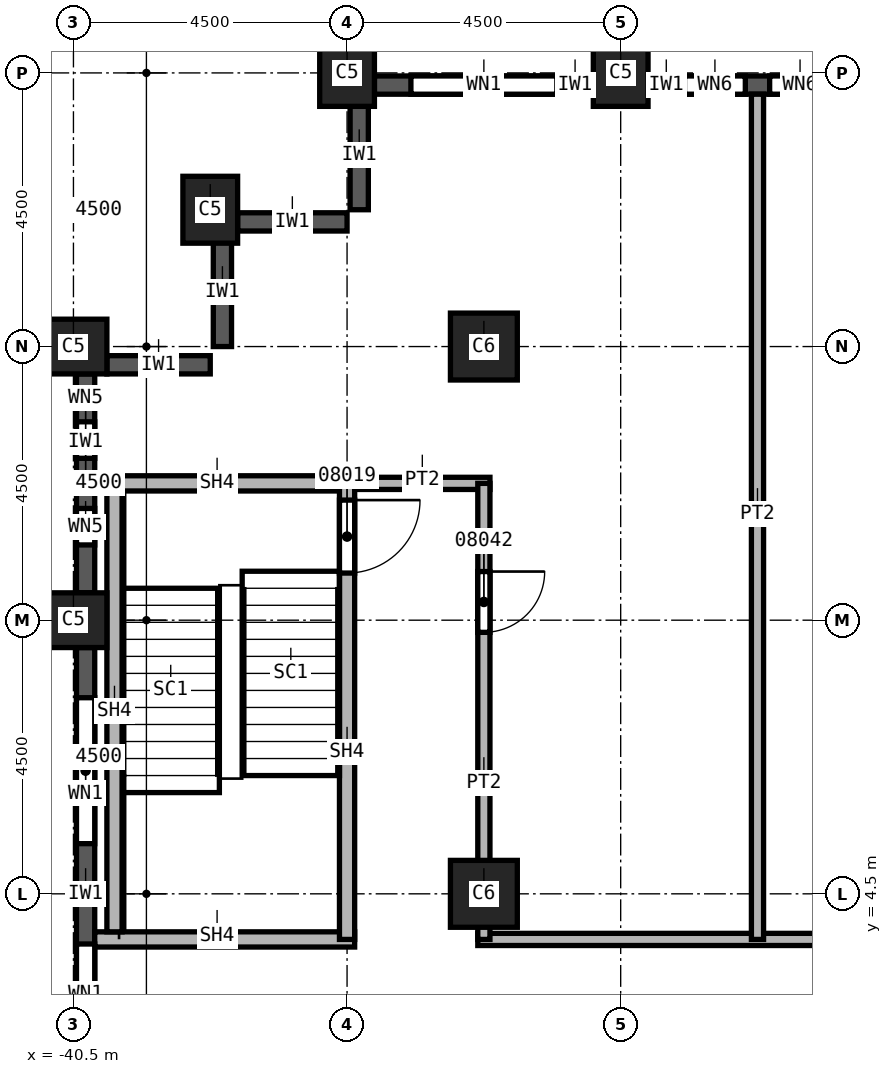
"""IFC4 building model, lengths in metres.
Left out: names, types, materials, properties, quantities, classifications, styles, units other than length and angle.
Written with IfcOpenShell. Run it as: python <this file> out.ifc"""

import sys

from ifc_helpers import new_model, si_unit, direction, frame, frame_2d, origin, origin_2d, place, context, subcontext, project, spatial, rectangle, extrude, element, fill, save


model = new_model("IFC4")
c1 = context("Model", 3, precision=1e-05, world=origin(), true_north=direction((0.0, 1.0)))
c2 = subcontext(c1, "Body", "Model", "MODEL_VIEW")
j1 = project(units=[si_unit("LENGTHUNIT", "METRE"), si_unit("PLANEANGLEUNIT", "RADIAN")], contexts=[c1])
p1 = place(None, origin())
s1 = spatial("IfcSite", under=j1, at=p1, CompositionType="ELEMENT")
p2 = place(p1, origin())
s2 = spatial("IfcBuilding", under=s1, at=p2, CompositionType="ELEMENT")
p3 = place(p2, frame((0.0, 0.0, 150.0)))
s3 = spatial("IfcBuildingStorey", under=s2, at=p3, CompositionType="ELEMENT", Elevation=150.0)
for number, where, z_axis, x_axis in (
    (1, (-40.5, 9.0, 0.0), (0.0, 0.0, 1.0), (0.0, 1.0, 0.0)),
    (2, (-40.5, 13.5, 0.0), (0.0, 0.0, 1.0), (0.0, 1.0, 0.0)),
    (3, (-38.25, 15.75, 0.0), (0.0, 0.0, 1.0), (1.0, 0.0, 0.0)),
    (4, (-31.5, 18.0, 0.0), (0.0, 0.0, 1.0), (1.0, 0.0, 0.0)),
    (5, (-36.0, 18.0, 0.0), (0.0, 0.0, 1.0), (1.0, 0.0, 0.0)),
):
    element("IfcColumn", number, at=place(p3, frame(where, z_axis=z_axis, x_axis=x_axis)), inside=s3, PredefinedType="COLUMN", context=c2, shape_type="SweptSolid", body=[
        extrude(rectangle(XDim=0.9, YDim=1.1, at=origin_2d()), origin(), (0.0, 0.0, 1.0), 3.7),
    ])
for number, where, z_axis, x_axis in (
    (6, (-33.75, 4.5, 0.0), (0.0, 0.0, 1.0), (1.0, 0.0, 0.0)),
    (7, (-33.75, 13.5, 0.0), (0.0, 0.0, 1.0), (1.0, 0.0, 0.0)),
):
    element("IfcColumn", number, at=place(p3, frame(where, z_axis=z_axis, x_axis=x_axis)), inside=s3, PredefinedType="COLUMN", context=c2, shape_type="SweptSolid", body=[
        extrude(rectangle(XDim=1.1, YDim=1.1, at=origin_2d()), origin(), (0.0, 0.0, 1.0), 3.7),
    ])
for number, where, z_axis, x_axis in (
    (8, (-35.8, 17.55, 0.0), (0.0, 0.0, 1.0), (0.0, -1.0, 0.0)),
    (9, (-37.8, 15.55, 0.0), (0.0, 0.0, 1.0), (1.0, 0.0, 0.0)),
    (10, (-38.05, 15.3, 0.0), (0.0, 0.0, 1.0), (0.0, -1.0, 0.0)),
):
    element("IfcWall", number, at=place(p3, frame(where, z_axis=z_axis, x_axis=x_axis)), inside=s3, PredefinedType="SOLIDWALL", context=c2, shape_type="SweptSolid", body=[
        extrude(rectangle(XDim=1.8, YDim=0.3, at=frame_2d((0.9, 0.0))), origin(), (0.0, 0.0, 1.0), 3.1),
    ])
p4 = place(p3, frame((-39.95, 13.2, 0.0), z_axis=(0.0, 0.0, 1.0), x_axis=(1.0, 0.0, 0.0)))
e11 = element("IfcWall", 11, at=p4, inside=s3, PredefinedType="SOLIDWALL", context=c2, shape_type="SweptSolid", body=[
    extrude(rectangle(XDim=1.7, YDim=0.3, at=frame_2d((0.85, 0.0))), origin(), (0.0, 0.0, 1.0), 3.1),
])
p5 = place(p3, frame((-27.45, 17.8, 0.0), z_axis=(0.0, 0.0, 1.0), x_axis=(-1.0, 0.0, 0.0)))
e12 = element("IfcWall", 12, at=p5, inside=s3, PredefinedType="SOLIDWALL", context=c2, shape_type="SweptSolid", body=[
    extrude(rectangle(XDim=3.6, YDim=0.3, at=frame_2d((1.8, 0.0))), origin(), (0.0, 0.0, 1.0), 3.1),
])
p6 = place(p5, frame((0.6, 0.0, 0.8)))
e13 = element("IfcOpeningElement", 13, at=p6, cuts=e12, PredefinedType="OPENING", context=c2, shape_type="SweptSolid", body=[
    extrude(rectangle(XDim=1.0, YDim=1.95, at=frame_2d((0.5, 0.975))), frame((0.0, 0.15, 0.0), z_axis=(0.0, -1.0, 0.0), x_axis=(1.0, 0.0, 0.0)), (0.0, 0.0, 1.0), 0.3),
])
p7 = place(p5, frame((2.0, 0.0, 0.8)))
e14 = element("IfcOpeningElement", 14, at=p7, cuts=e12, PredefinedType="OPENING", context=c2, shape_type="SweptSolid", body=[
    extrude(rectangle(XDim=1.0, YDim=1.95, at=frame_2d((0.5, 0.975))), frame((0.0, 0.15, 0.0), z_axis=(0.0, -1.0, 0.0), x_axis=(1.0, 0.0, 0.0)), (0.0, 0.0, 1.0), 0.3),
])
p8 = place(p3, frame((-31.95, 17.8, 0.0), z_axis=(0.0, 0.0, 1.0), x_axis=(-1.0, 0.0, 0.0)))
e15 = element("IfcWall", 15, at=p8, inside=s3, PredefinedType="SOLIDWALL", context=c2, shape_type="SweptSolid", body=[
    extrude(rectangle(XDim=3.6, YDim=0.3, at=frame_2d((1.8, 0.0))), origin(), (0.0, 0.0, 1.0), 3.1),
])
p9 = place(p8, frame((0.6, 0.0, 0.8)))
e16 = element("IfcOpeningElement", 16, at=p9, cuts=e15, PredefinedType="OPENING", context=c2, shape_type="SweptSolid", body=[
    extrude(rectangle(XDim=2.4, YDim=1.95, at=frame_2d((1.2, 0.975))), frame((0.0, 0.15, 0.0), z_axis=(0.0, -1.0, 0.0), x_axis=(1.0, 0.0, 0.0)), (0.0, 0.0, 1.0), 0.3),
])
p10 = place(p3, frame((-40.3, 13.05, 0.0), z_axis=(0.0, 0.0, 1.0), x_axis=(0.0, -1.0, 0.0)))
e17 = element("IfcWall", 17, at=p10, inside=s3, PredefinedType="SOLIDWALL", context=c2, shape_type="SweptSolid", body=[
    extrude(rectangle(XDim=3.6, YDim=0.3, at=frame_2d((1.8, 0.0))), origin(), (0.0, 0.0, 1.0), 3.1),
])
p11 = place(p10, frame((0.788, 0.0, 0.8)))
e18 = element("IfcOpeningElement", 18, at=p11, cuts=e17, PredefinedType="OPENING", context=c2, shape_type="SweptSolid", body=[
    extrude(rectangle(XDim=0.6, YDim=1.95, at=frame_2d((0.3, 0.975))), frame((0.0, 0.15, 0.0), z_axis=(0.0, -1.0, 0.0), x_axis=(1.0, 0.0, 0.0)), (0.0, 0.0, 1.0), 0.3),
])
p12 = place(p10, frame((2.212, 0.0, 0.8)))
e19 = element("IfcOpeningElement", 19, at=p12, cuts=e17, PredefinedType="OPENING", context=c2, shape_type="SweptSolid", body=[
    extrude(rectangle(XDim=0.6, YDim=1.95, at=frame_2d((0.3, 0.975))), frame((0.0, 0.15, 0.0), z_axis=(0.0, -1.0, 0.0), x_axis=(1.0, 0.0, 0.0)), (0.0, 0.0, 1.0), 0.3),
])
p13 = place(p3, frame((-40.3, 8.55, 0.0), z_axis=(0.0, 0.0, 1.0), x_axis=(0.0, -1.0, 0.0)))
e20 = element("IfcWall", 20, at=p13, inside=s3, PredefinedType="SOLIDWALL", context=c2, shape_type="SweptSolid", body=[
    extrude(rectangle(XDim=8.1, YDim=0.3, at=frame_2d((4.05, 0.0))), origin(), (0.0, 0.0, 1.0), 3.1),
])
p14 = place(p13, frame((0.825, 0.0, 0.8)))
e21 = element("IfcOpeningElement", 21, at=p14, cuts=e20, PredefinedType="OPENING", context=c2, shape_type="SweptSolid", body=[
    extrude(rectangle(XDim=2.4, YDim=1.95, at=frame_2d((1.2, 0.975))), frame((0.0, 0.15, 0.0), z_axis=(0.0, -1.0, 0.0), x_axis=(1.0, 0.0, 0.0)), (0.0, 0.0, 1.0), 0.3),
])
p15 = place(p13, frame((4.875, 0.0, 0.8)))
e22 = element("IfcOpeningElement", 22, at=p15, cuts=e20, PredefinedType="OPENING", context=c2, shape_type="SweptSolid", body=[
    extrude(rectangle(XDim=2.4, YDim=1.95, at=frame_2d((1.2, 0.975))), frame((0.0, 0.15, 0.0), z_axis=(0.0, -1.0, 0.0), x_axis=(1.0, 0.0, 0.0)), (0.0, 0.0, 1.0), 0.3),
])
p16 = place(p3, frame((-36.0, 11.25, 0.0), z_axis=(0.0, 0.0, 1.0), x_axis=(1.0, 0.0, 0.0)))
e23 = element("IfcWall", 23, at=p16, inside=s3, PredefinedType="PARTITIONING", context=c2, shape_type="SweptSolid", body=[
    extrude(rectangle(XDim=2.35, YDim=0.2, at=frame_2d((1.175, 0.0))), origin(), (0.0, 0.0, 1.0), 3.7),
])
p17 = place(p3, frame((-33.85, 3.75, 0.0), z_axis=(0.0, 0.0, 1.0), x_axis=(1.0, 0.0, 0.0)))
e24 = element("IfcWall", 24, at=p17, inside=s3, PredefinedType="PARTITIONING", context=c2, shape_type="SweptSolid", body=[
    extrude(rectangle(XDim=13.95, YDim=0.2, at=frame_2d((6.975, 0.0))), origin(), (0.0, 0.0, 1.0), 3.7),
])
p18 = place(p3, frame((-33.75, 11.25, 0.0), z_axis=(0.0, 0.0, 1.0), x_axis=(0.0, -1.0, 0.0)))
e25 = element("IfcWall", 25, at=p18, inside=s3, PredefinedType="PARTITIONING", context=c2, shape_type="SweptSolid", body=[
    extrude(rectangle(XDim=7.5, YDim=0.2, at=frame_2d((3.75, 0.0))), origin(), (0.0, 0.0, 1.0), 3.7),
])
p19 = place(p18, frame((1.45, 0.0, 0.0)))
e26 = element("IfcOpeningElement", 26, at=p19, cuts=e25, PredefinedType="OPENING", context=c2, shape_type="SweptSolid", body=[
    extrude(rectangle(XDim=1.0, YDim=2.1, at=frame_2d((0.5, 1.05))), frame((0.0, 0.1, 0.0), z_axis=(0.0, -1.0, 0.0), x_axis=(1.0, 0.0, 0.0)), (0.0, 0.0, 1.0), 0.2),
])
p20 = place(p3, frame((-29.25, 3.75, 0.0), z_axis=(0.0, 0.0, 1.0), x_axis=(0.0, 1.0, 0.0)))
e27 = element("IfcWall", 27, at=p20, inside=s3, PredefinedType="PARTITIONING", context=c2, shape_type="SweptSolid", body=[
    extrude(rectangle(XDim=13.9, YDim=0.2, at=frame_2d((6.95, 0.0))), origin(), (0.0, 0.0, 1.0), 3.7),
])
p21 = place(p3, frame((-40.15, 3.75, 0.0), z_axis=(0.0, 0.0, 1.0), x_axis=(1.0, 0.0, 0.0)))
e28 = element("IfcWall", 28, at=p21, inside=s3, PredefinedType="SOLIDWALL", context=c2, shape_type="SweptSolid", body=[
    extrude(rectangle(XDim=4.275, YDim=0.25, at=frame_2d((2.137, 0.0))), origin(), (0.0, 0.0, 1.0), 3.7),
])
p22 = place(p3, frame((-40.15, 11.25, 0.0), z_axis=(0.0, 0.0, 1.0), x_axis=(1.0, 0.0, 0.0)))
e29 = element("IfcWall", 29, at=p22, inside=s3, PredefinedType="SOLIDWALL", context=c2, shape_type="SweptSolid", body=[
    extrude(rectangle(XDim=4.15, YDim=0.25, at=frame_2d((2.075, 0.0))), origin(), (0.0, 0.0, 1.0), 3.7),
])
p23 = place(p3, frame((-36.0, 11.375, 0.0), z_axis=(0.0, 0.0, 1.0), x_axis=(0.0, -1.0, 0.0)))
e30 = element("IfcWall", 30, at=p23, inside=s3, PredefinedType="SOLIDWALL", context=c2, shape_type="SweptSolid", body=[
    extrude(rectangle(XDim=7.625, YDim=0.25, at=frame_2d((3.812, 0.0))), origin(), (0.0, 0.0, 1.0), 3.7),
])
p24 = place(p23, frame((0.4, 0.0, 0.0)))
e31 = element("IfcOpeningElement", 31, at=p24, cuts=e30, PredefinedType="OPENING", context=c2, shape_type="SweptSolid", body=[
    extrude(rectangle(XDim=1.2, YDim=2.1, at=frame_2d((0.6, 1.05))), frame((0.0, 0.125, 0.0), z_axis=(0.0, -1.0, 0.0), x_axis=(1.0, 0.0, 0.0)), (0.0, 0.0, 1.0), 0.25),
])
p25 = place(p3, frame((-39.825, 3.875, 0.0), z_axis=(0.0, 0.0, 1.0), x_axis=(0.0, 1.0, 0.0)))
e32 = element("IfcWall", 32, at=p25, inside=s3, PredefinedType="SOLIDWALL", context=c2, shape_type="SweptSolid", body=[
    extrude(rectangle(XDim=7.25, YDim=0.25, at=frame_2d((3.625, 0.0))), origin(), (0.0, 0.0, 1.0), 3.7),
])
p26 = place(p9, origin())
e33 = element("IfcWindow", 33, at=p26, inside=s3, PartitioningType="SINGLE_PANEL", PredefinedType="WINDOW", context=c2, shape_type="SweptSolid", body=[
    extrude(rectangle(XDim=2.4, YDim=1.95, at=frame_2d((1.2, 0.975))), frame((0.0, 0.03, 0.0), z_axis=(0.0, -1.0, 0.0), x_axis=(1.0, 0.0, 0.0)), (0.0, 0.0, 1.0), 0.06),
])
fill(e16, e33)
p27 = place(p14, origin())
e34 = element("IfcWindow", 34, at=p27, inside=s3, PartitioningType="SINGLE_PANEL", PredefinedType="WINDOW", context=c2, shape_type="SweptSolid", body=[
    extrude(rectangle(XDim=2.4, YDim=1.95, at=frame_2d((1.2, 0.975))), frame((0.0, 0.03, 0.0), z_axis=(0.0, -1.0, 0.0), x_axis=(1.0, 0.0, 0.0)), (0.0, 0.0, 1.0), 0.06),
])
fill(e21, e34)
p28 = place(p15, origin())
e35 = element("IfcWindow", 35, at=p28, inside=s3, PartitioningType="SINGLE_PANEL", PredefinedType="WINDOW", context=c2, shape_type="SweptSolid", body=[
    extrude(rectangle(XDim=2.4, YDim=1.95, at=frame_2d((1.2, 0.975))), frame((0.0, 0.03, 0.0), z_axis=(0.0, -1.0, 0.0), x_axis=(1.0, 0.0, 0.0)), (0.0, 0.0, 1.0), 0.06),
])
fill(e22, e35)
p29 = place(p24, origin())
e36 = element("IfcDoor", 36, at=p29, inside=s3, OperationType="SINGLE_SWING_RIGHT", PredefinedType="DOOR", context=c2, shape_type="SweptSolid", body=[
    extrude(rectangle(XDim=1.2, YDim=2.1, at=frame_2d((0.6, 1.05))), frame((0.0, 0.025, 0.0), z_axis=(0.0, -1.0, 0.0), x_axis=(1.0, 0.0, 0.0)), (0.0, 0.0, 1.0), 0.05),
])
fill(e31, e36)
p30 = place(p19, origin())
e37 = element("IfcDoor", 37, at=p30, inside=s3, OperationType="SINGLE_SWING_LEFT", PredefinedType="DOOR", context=c2, shape_type="SweptSolid", body=[
    extrude(rectangle(XDim=1.0, YDim=2.1, at=frame_2d((0.5, 1.05))), frame((0.0, 0.025, 0.0), z_axis=(0.0, -1.0, 0.0), x_axis=(1.0, 0.0, 0.0)), (0.0, 0.0, 1.0), 0.05),
])
fill(e26, e37)
p31 = place(p6, origin())
e38 = element("IfcWindow", 38, at=p31, inside=s3, PartitioningType="SINGLE_PANEL", PredefinedType="WINDOW", context=c2, shape_type="SweptSolid", body=[
    extrude(rectangle(XDim=1.0, YDim=1.95, at=frame_2d((0.5, 0.975))), frame((0.0, 0.03, 0.0), z_axis=(0.0, -1.0, 0.0), x_axis=(1.0, 0.0, 0.0)), (0.0, 0.0, 1.0), 0.06),
])
fill(e13, e38)
p32 = place(p7, origin())
e39 = element("IfcWindow", 39, at=p32, inside=s3, PartitioningType="SINGLE_PANEL", PredefinedType="WINDOW", context=c2, shape_type="SweptSolid", body=[
    extrude(rectangle(XDim=1.0, YDim=1.95, at=frame_2d((0.5, 0.975))), frame((0.0, 0.03, 0.0), z_axis=(0.0, -1.0, 0.0), x_axis=(1.0, 0.0, 0.0)), (0.0, 0.0, 1.0), 0.06),
])
fill(e14, e39)
p33 = place(p11, origin())
e40 = element("IfcWindow", 40, at=p33, inside=s3, PartitioningType="SINGLE_PANEL", PredefinedType="WINDOW", context=c2, shape_type="SweptSolid", body=[
    extrude(rectangle(XDim=0.6, YDim=1.95, at=frame_2d((0.3, 0.975))), frame((0.0, 0.03, 0.0), z_axis=(0.0, -1.0, 0.0), x_axis=(1.0, 0.0, 0.0)), (0.0, 0.0, 1.0), 0.06),
])
fill(e18, e40)
p34 = place(p12, origin())
e41 = element("IfcWindow", 41, at=p34, inside=s3, PartitioningType="SINGLE_PANEL", PredefinedType="WINDOW", context=c2, shape_type="SweptSolid", body=[
    extrude(rectangle(XDim=0.6, YDim=1.95, at=frame_2d((0.3, 0.975))), frame((0.0, 0.03, 0.0), z_axis=(0.0, -1.0, 0.0), x_axis=(1.0, 0.0, 0.0)), (0.0, 0.0, 1.0), 0.06),
])
fill(e19, e41)
save(model, sys.argv[1])
